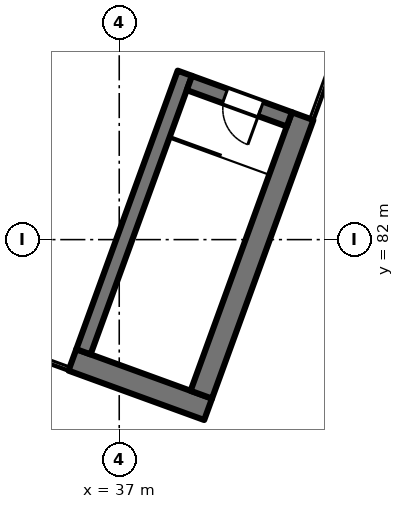
"""IFC4 building model, lengths in metres.
Left out: names, types, materials, properties, quantities, classifications, styles, units other than length and angle.
Written with IfcOpenShell. Run it as: python <this file> out.ifc"""

import sys

from ifc_helpers import new_model, si_unit, direction, frame, frame_2d, origin, place, context, subcontext, project, spatial, rectangle, extrude, element, fill, save


model = new_model("IFC4")
c1 = context("Model", 3, precision=1e-05, world=origin(), true_north=direction((0.0, 1.0)))
c2 = subcontext(c1, "Body", "Model", "MODEL_VIEW")
j1 = project(units=[si_unit("LENGTHUNIT", "METRE"), si_unit("PLANEANGLEUNIT", "RADIAN")], contexts=[c1])
p1 = place(None, origin())
s1 = spatial("IfcSite", under=j1, at=p1, CompositionType="ELEMENT")
p2 = place(p1, origin())
s2 = spatial("IfcBuilding", under=s1, at=p2, CompositionType="ELEMENT")
p3 = place(p2, frame((0.0, 0.0, 236.0)))
s3 = spatial("IfcBuildingStorey", under=s2, at=p3, CompositionType="ELEMENT", Elevation=236.0)
p4 = place(p3, frame((39.338, 77.535, 0.0), z_axis=(0.0, 0.0, 1.0), x_axis=(-0.939701471648, 0.341995824804, 0.0)))
e1 = element("IfcWall", 1, at=p4, inside=s3, PredefinedType="SHEAR", context=c2, shape_type="SweptSolid", body=[
    extrude(rectangle(XDim=3.8, YDim=0.6, at=frame_2d((1.9, 0.0))), origin(), (0.0, 0.0, 1.0), 5.5),
])
p5 = place(p3, frame((39.159, 77.92, 0.0), z_axis=(0.0, 0.0, 1.0), x_axis=(0.342016982193, 0.939693771338, 0.0)))
e2 = element("IfcWall", 2, at=p5, inside=s3, PredefinedType="SHEAR", context=c2, shape_type="SweptSolid", body=[
    extrude(rectangle(XDim=7.8, YDim=0.6, at=frame_2d((3.9, 0.0))), origin(), (0.0, 0.0, 1.0), 5.5),
])
p6 = place(p3, frame((36.058, 79.048, 0.0), z_axis=(0.0, 0.0, 1.0), x_axis=(0.342016982193, 0.939693771338, 0.0)))
e3 = element("IfcWall", 3, at=p6, inside=s3, PredefinedType="SHEAR", context=c2, shape_type="SweptSolid", body=[
    extrude(rectangle(XDim=7.8, YDim=0.4, at=frame_2d((3.9, 0.0))), origin(), (0.0, 0.0, 1.0), 5.5),
])
p7 = place(p3, frame((41.476, 85.164, 0.0), z_axis=(0.0, 0.0, 1.0), x_axis=(-0.939678810556, 0.342058084236, 0.0)))
e4 = element("IfcWall", 4, at=p7, inside=s3, PredefinedType="SHEAR", context=c2, shape_type="SweptSolid", body=[
    extrude(rectangle(XDim=2.8, YDim=0.4, at=frame_2d((1.4, 0.0))), origin(), (0.0, 0.0, 1.0), 5.5),
])
p8 = place(p7, frame((0.8, 0.0, 0.0)))
e5 = element("IfcOpeningElement", 5, at=p8, cuts=e4, PredefinedType="OPENING", context=c2, shape_type="SweptSolid", body=[
    extrude(rectangle(XDim=1.0, YDim=2.1, at=frame_2d((0.5, 1.05))), frame((0.0, 0.21, 0.0), z_axis=(0.0, -1.0, 0.0), x_axis=(1.0, 0.0, 0.0)), (0.0, 0.0, 1.0), 0.42),
])
p9 = place(p8, origin())
e6 = element("IfcDoor", 6, at=p9, inside=s3, OperationType="SINGLE_SWING_LEFT", PredefinedType="DOOR", context=c2, shape_type="SweptSolid", body=[
    extrude(rectangle(XDim=1.0, YDim=2.1, at=frame_2d((0.5, 1.05))), frame((0.0, 0.025, 0.0), z_axis=(0.0, -1.0, 0.0), x_axis=(1.0, 0.0, 0.0)), (0.0, 0.0, 1.0), 0.05),
])
fill(e5, e6)
save(model, sys.argv[1])
